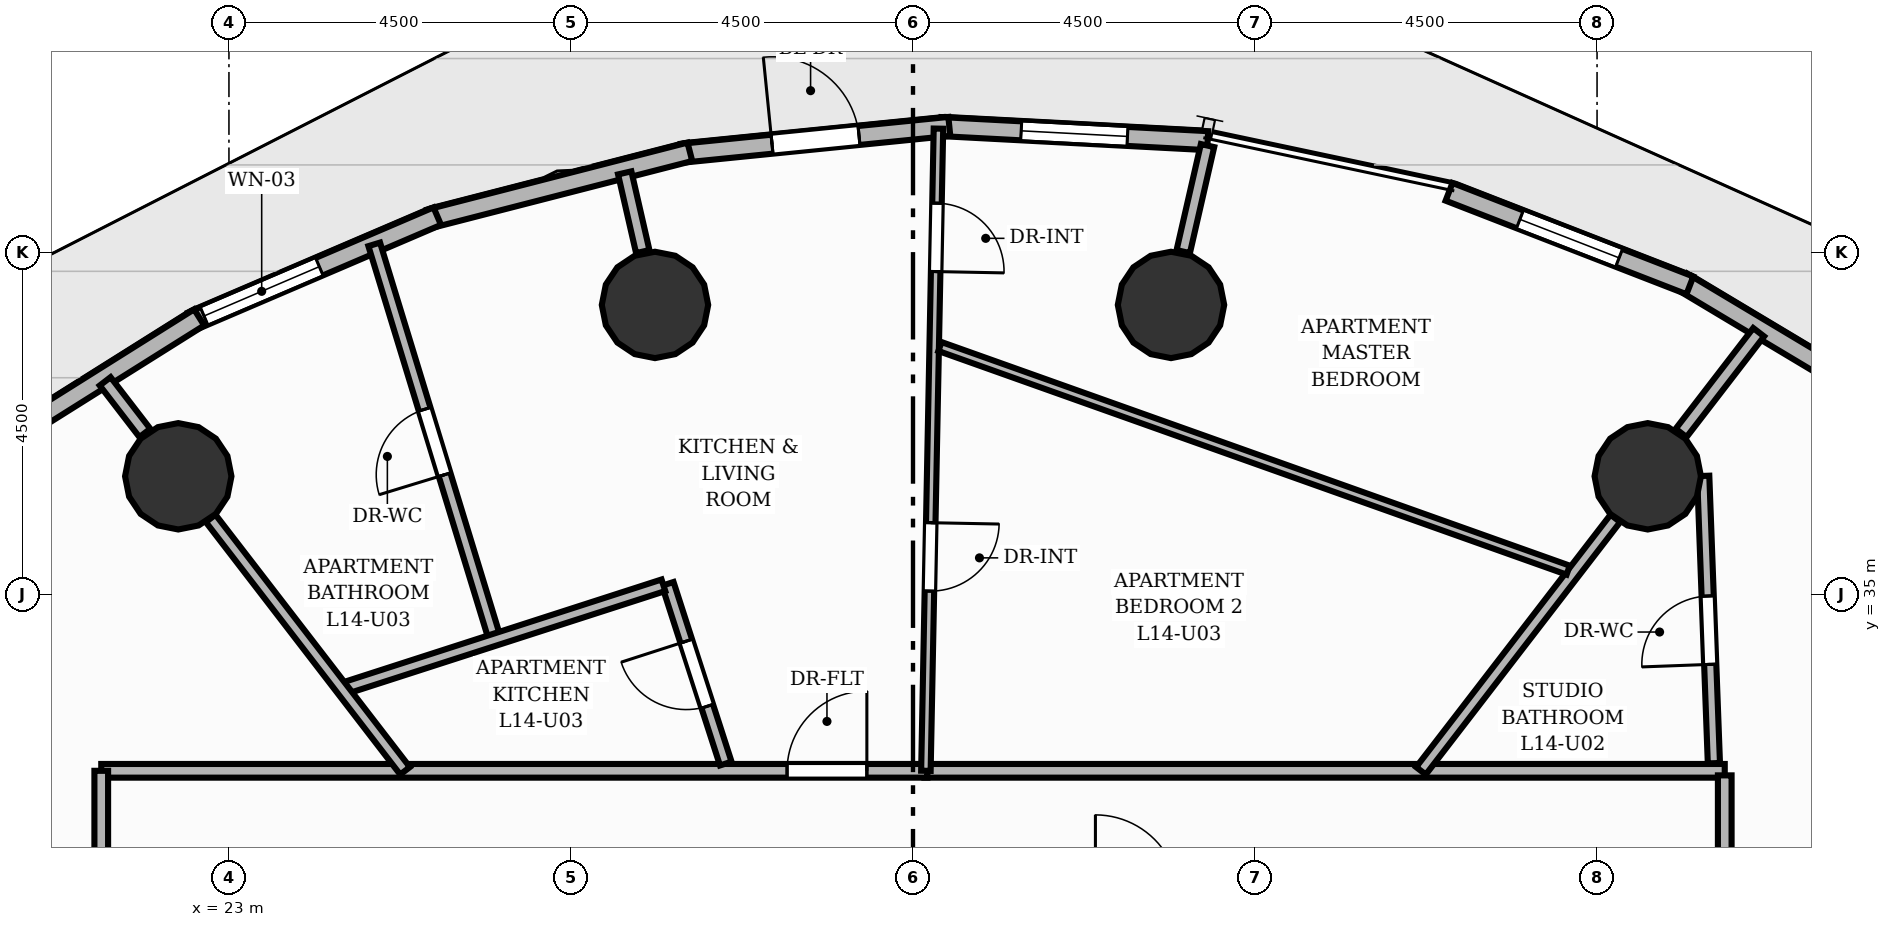
"""IFC4 building model, lengths in metres.
Left out: names, types, materials, properties, quantities, classifications, styles, units other than length and angle.
Written with IfcOpenShell. Run it as: python <this file> out.ifc"""

import sys

from ifc_helpers import new_model, si_unit, direction, frame, frame_2d, origin, origin_2d, place, context, subcontext, project, spatial, rectangle, circle, extrude, element, fill, save


model = new_model("IFC4")
c1 = context("Model", 3, precision=1e-05, world=origin(), true_north=direction((0.0, 1.0)))
c2 = subcontext(c1, "Body", "Model", "MODEL_VIEW")
j1 = project(units=[si_unit("LENGTHUNIT", "METRE"), si_unit("PLANEANGLEUNIT", "RADIAN")], contexts=[c1])
p1 = place(None, origin())
s1 = spatial("IfcSite", under=j1, at=p1, CompositionType="ELEMENT")
p2 = place(p1, origin())
s2 = spatial("IfcBuilding", under=s1, at=p2, CompositionType="ELEMENT")
p3 = place(p2, frame((0.0, 0.0, 50.4)))
s3 = spatial("IfcBuildingStorey", under=s2, at=p3, CompositionType="ELEMENT", Elevation=50.4)
for number, where, z_axis, x_axis in (
    (1, (41.667, 36.555, 0.0), (0.0, 0.0, 1.0), (1.0, 0.0, 0.0)),
    (2, (35.395, 38.81, 0.0), (0.0, 0.0, 1.0), (1.0, 0.0, 0.0)),
    (3, (28.605, 38.81, 0.0), (0.0, 0.0, 1.0), (1.0, 0.0, 0.0)),
    (4, (22.333, 36.555, 0.0), (0.0, 0.0, 1.0), (1.0, 0.0, 0.0)),
):
    element("IfcColumn", number, at=place(p3, frame(where, z_axis=z_axis, x_axis=x_axis)), inside=s3, PredefinedType="COLUMN", context=c2, shape_type="SweptSolid", body=[
        extrude(circle(Radius=0.7, at=origin_2d()), origin(), (0.0, 0.0, 1.0), 3.2),
    ])
p4 = place(p3, frame((42.122, 39.116, 0.0), z_axis=(0.0, 0.0, 1.0), x_axis=(0.858069400356, -0.513533742001, 0.0)))
e5 = element("IfcWall", 5, at=p4, inside=s3, PredefinedType="SOLIDWALL", context=c2, shape_type="SweptSolid", body=[
    extrude(rectangle(XDim=3.323, YDim=0.25, at=frame_2d((1.661, 0.0))), origin(), (0.0, 0.0, 1.0), 2.96),
])
p5 = place(p3, frame((39.053, 40.298, 0.0), z_axis=(0.0, 0.0, 1.0), x_axis=(0.932140755825, -0.362096135479, 0.0)))
e6 = element("IfcWall", 6, at=p5, inside=s3, PredefinedType="SOLIDWALL", context=c2, shape_type="SweptSolid", body=[
    extrude(rectangle(XDim=3.399, YDim=0.25, at=frame_2d((1.699, 0.0))), origin(), (0.0, 0.0, 1.0), 2.96),
])
p6 = place(p5, frame((1.0, 0.0, 0.85)))
e7 = element("IfcOpeningElement", 7, at=p6, cuts=e6, PredefinedType="OPENING", context=c2, shape_type="SweptSolid", body=[
    extrude(rectangle(XDim=1.4, YDim=1.55, at=frame_2d((0.7, 0.775))), frame((0.0, 0.135, 0.0), z_axis=(0.0, -1.0, 0.0), x_axis=(1.0, 0.0, 0.0)), (0.0, 0.0, 1.0), 0.27),
])
p7 = place(p3, frame((32.369, 41.156, 0.0), z_axis=(0.0, 0.0, 1.0), x_axis=(0.99860782827, -0.052748510102, 0.0)))
e8 = element("IfcWall", 8, at=p7, inside=s3, PredefinedType="SOLIDWALL", context=c2, shape_type="SweptSolid", body=[
    extrude(rectangle(XDim=3.513, YDim=0.25, at=frame_2d((1.756, 0.0))), origin(), (0.0, 0.0, 1.0), 2.96),
])
p8 = place(p7, frame((1.056, 0.0, 0.85)))
e9 = element("IfcOpeningElement", 9, at=p8, cuts=e8, PredefinedType="OPENING", context=c2, shape_type="SweptSolid", body=[
    extrude(rectangle(XDim=1.4, YDim=1.55, at=frame_2d((0.7, 0.775))), frame((0.0, 0.135, 0.0), z_axis=(0.0, -1.0, 0.0), x_axis=(1.0, 0.0, 0.0)), (0.0, 0.0, 1.0), 0.27),
])
p9 = place(p3, frame((28.957, 40.806, 0.0), z_axis=(0.0, 0.0, 1.0), x_axis=(0.994996115016, 0.099913618207, 0.0)))
e10 = element("IfcWall", 10, at=p9, inside=s3, PredefinedType="SOLIDWALL", context=c2, shape_type="SweptSolid", body=[
    extrude(rectangle(XDim=3.538, YDim=0.25, at=frame_2d((1.769, 0.0))), origin(), (0.0, 0.0, 1.0), 2.96),
])
p10 = place(p9, frame((1.194, 0.0, 0.0)))
e11 = element("IfcOpeningElement", 11, at=p10, cuts=e10, PredefinedType="OPENING", context=c2, shape_type="SweptSolid", body=[
    extrude(rectangle(XDim=1.15, YDim=2.2, at=frame_2d((0.575, 1.1))), frame((0.0, 0.135, 0.0), z_axis=(0.0, -1.0, 0.0), x_axis=(1.0, 0.0, 0.0)), (0.0, 0.0, 1.0), 0.27),
])
p11 = place(p3, frame((25.638, 39.943, 0.0), z_axis=(0.0, 0.0, 1.0), x_axis=(0.968459637573, 0.249170484594, 0.0)))
e12 = element("IfcWall", 12, at=p11, inside=s3, PredefinedType="SOLIDWALL", context=c2, shape_type="SweptSolid", body=[
    extrude(rectangle(XDim=3.538, YDim=0.25, at=frame_2d((1.769, 0.0))), origin(), (0.0, 0.0, 1.0), 2.96),
])
p12 = place(p3, frame((22.511, 38.595, 0.0), z_axis=(0.0, 0.0, 1.0), x_axis=(0.919263615987, 0.393642482872, 0.0)))
e13 = element("IfcWall", 13, at=p12, inside=s3, PredefinedType="SOLIDWALL", context=c2, shape_type="SweptSolid", body=[
    extrude(rectangle(XDim=3.513, YDim=0.25, at=frame_2d((1.756, 0.0))), origin(), (0.0, 0.0, 1.0), 2.96),
])
p13 = place(p12, frame((0.175, 0.0, 0.85)))
e14 = element("IfcOpeningElement", 14, at=p13, cuts=e13, PredefinedType="OPENING", context=c2, shape_type="SweptSolid", body=[
    extrude(rectangle(XDim=1.65, YDim=1.55, at=frame_2d((0.825, 0.775))), frame((0.0, 0.135, 0.0), z_axis=(0.0, -1.0, 0.0), x_axis=(1.0, 0.0, 0.0)), (0.0, 0.0, 1.0), 0.27),
])
p14 = place(p3, frame((19.674, 36.803, 0.0), z_axis=(0.0, 0.0, 1.0), x_axis=(0.846852351865, 0.531828068215, 0.0)))
e15 = element("IfcWall", 15, at=p14, inside=s3, PredefinedType="SOLIDWALL", context=c2, shape_type="SweptSolid", body=[
    extrude(rectangle(XDim=3.465, YDim=0.25, at=frame_2d((1.732, 0.0))), origin(), (0.0, 0.0, 1.0), 2.96),
])
p15 = place(p3, frame((42.106, 37.126, 0.0), z_axis=(0.0, 0.0, 1.0), x_axis=(0.610021184497, 0.792385104898, 0.0)))
e16 = element("IfcWall", 16, at=p15, inside=s3, PredefinedType="PARTITIONING", context=c2, shape_type="SweptSolid", body=[
    extrude(rectangle(XDim=1.672, YDim=0.18, at=frame_2d((0.836, 0.0))), origin(), (0.0, 0.0, 1.0), 2.178),
])
p16 = place(p3, frame((35.555, 39.512, 0.0), z_axis=(0.0, 0.0, 1.0), x_axis=(0.223463944202, 0.974712196313, 0.0)))
e17 = element("IfcWall", 17, at=p16, inside=s3, PredefinedType="PARTITIONING", context=c2, shape_type="SweptSolid", body=[
    extrude(rectangle(XDim=1.431, YDim=0.18, at=frame_2d((0.716, 0.0))), origin(), (0.0, 0.0, 1.0), 2.178),
])
p17 = place(p3, frame((28.445, 39.512, 0.0), z_axis=(0.0, 0.0, 1.0), x_axis=(-0.223348866575, 0.974738572028, 0.0)))
e18 = element("IfcWall", 18, at=p17, inside=s3, PredefinedType="PARTITIONING", context=c2, shape_type="SweptSolid", body=[
    extrude(rectangle(XDim=1.062, YDim=0.18, at=frame_2d((0.531, 0.0))), origin(), (0.0, 0.0, 1.0), 2.178),
])
p18 = place(p3, frame((21.894, 37.126, 0.0), z_axis=(0.0, 0.0, 1.0), x_axis=(-0.610124026743, 0.792305920709, 0.0)))
e19 = element("IfcWall", 19, at=p18, inside=s3, PredefinedType="PARTITIONING", context=c2, shape_type="SweptSolid", body=[
    extrude(rectangle(XDim=0.856, YDim=0.18, at=frame_2d((0.428, 0.0))), origin(), (0.0, 0.0, 1.0), 2.178),
])
p19 = place(p3, frame((32.15, 32.68, 0.0), z_axis=(0.0, 0.0, 1.0), x_axis=(1.0, 0.0, 0.0)))
e20 = element("IfcWall", 20, at=p19, inside=s3, PredefinedType="PARTITIONING", context=c2, shape_type="SweptSolid", body=[
    extrude(rectangle(XDim=10.53, YDim=0.18, at=frame_2d((5.265, 0.0))), origin(), (0.0, 0.0, 1.0), 2.955),
])
p20 = place(p3, frame((42.68, 32.62, 0.0), z_axis=(0.0, 0.0, 1.0), x_axis=(0.0, -1.0, 0.0)))
e21 = element("IfcWall", 21, at=p20, inside=s3, PredefinedType="PARTITIONING", context=c2, shape_type="SweptSolid", body=[
    extrude(rectangle(XDim=17.24, YDim=0.18, at=frame_2d((8.62, 0.0))), origin(), (0.0, 0.0, 1.0), 2.955),
])
p21 = place(p20, frame((8.095, 0.0, 0.0)))
e22 = element("IfcOpeningElement", 22, at=p21, cuts=e21, PredefinedType="OPENING", context=c2, shape_type="SweptSolid", body=[
    extrude(rectangle(XDim=1.05, YDim=2.15, at=frame_2d((0.525, 1.075))), frame((0.0, 0.1, 0.0), z_axis=(0.0, -1.0, 0.0), x_axis=(1.0, 0.0, 0.0)), (0.0, 0.0, 1.0), 0.2),
])
p22 = place(p3, frame((21.32, 32.68, 0.0), z_axis=(0.0, 0.0, 1.0), x_axis=(1.0, 0.0, 0.0)))
e23 = element("IfcWall", 23, at=p22, inside=s3, PredefinedType="PARTITIONING", context=c2, shape_type="SweptSolid", body=[
    extrude(rectangle(XDim=10.87, YDim=0.18, at=frame_2d((5.435, 0.0))), origin(), (0.0, 0.0, 1.0), 2.955),
])
p23 = place(p22, frame((9.023, 0.0, 0.0)))
e24 = element("IfcOpeningElement", 24, at=p23, cuts=e23, PredefinedType="OPENING", context=c2, shape_type="SweptSolid", body=[
    extrude(rectangle(XDim=1.05, YDim=2.15, at=frame_2d((0.525, 1.075))), frame((0.0, 0.1, 0.0), z_axis=(0.0, -1.0, 0.0), x_axis=(1.0, 0.0, 0.0)), (0.0, 0.0, 1.0), 0.2),
])
p24 = place(p3, frame((21.32, 15.38, 0.0), z_axis=(0.0, 0.0, 1.0), x_axis=(0.0, 1.0, 0.0)))
e25 = element("IfcWall", 25, at=p24, inside=s3, PredefinedType="PARTITIONING", context=c2, shape_type="SweptSolid", body=[
    extrude(rectangle(XDim=17.3, YDim=0.18, at=frame_2d((8.65, 0.0))), origin(), (0.0, 0.0, 1.0), 2.955),
])
p25 = place(p24, frame((8.125, 0.0, 0.0)))
e26 = element("IfcOpeningElement", 26, at=p25, cuts=e25, PredefinedType="OPENING", context=c2, shape_type="SweptSolid", body=[
    extrude(rectangle(XDim=1.05, YDim=2.15, at=frame_2d((0.525, 1.075))), frame((0.0, 0.1, 0.0), z_axis=(0.0, -1.0, 0.0), x_axis=(1.0, 0.0, 0.0)), (0.0, 0.0, 1.0), 0.2),
])
p26 = place(p3, frame((42.537, 32.78, 0.0), z_axis=(0.0, 0.0, 1.0), x_axis=(-0.037109528702, 0.99931120422, 0.0)))
e27 = element("IfcWall", 27, at=p26, inside=s3, PredefinedType="PLUMBINGWALL", context=c2, shape_type="SweptSolid", body=[
    extrude(rectangle(XDim=3.783, YDim=0.16, at=frame_2d((1.892, 0.0))), origin(), (0.0, 0.0, 1.0), 2.955),
])
p27 = place(p26, frame((1.302, 0.0, 0.0)))
e28 = element("IfcOpeningElement", 28, at=p27, cuts=e27, PredefinedType="OPENING", context=c2, shape_type="SweptSolid", body=[
    extrude(rectangle(XDim=0.9, YDim=2.1, at=frame_2d((0.45, 1.05))), frame((0.0, 0.09, 0.0), z_axis=(0.0, -1.0, 0.0), x_axis=(1.0, 0.0, 0.0)), (0.0, 0.0, 1.0), 0.18),
])
p28 = place(p3, frame((38.683, 32.68, 0.0), z_axis=(0.0, 0.0, 1.0), x_axis=(0.610034370134, 0.792374953703, 0.0)))
e29 = element("IfcWall", 29, at=p28, inside=s3, PredefinedType="PLUMBINGWALL", context=c2, shape_type="SweptSolid", body=[
    extrude(rectangle(XDim=4.192, YDim=0.16, at=frame_2d((2.096, 0.0))), origin(), (0.0, 0.0, 1.0), 2.178),
])
p29 = place(p3, frame((26.5, 34.406, 0.0), z_axis=(0.0, 0.0, 1.0), x_axis=(-0.292167210162, 0.956367252318, 0.0)))
e30 = element("IfcWall", 30, at=p29, inside=s3, PredefinedType="PLUMBINGWALL", context=c2, shape_type="SweptSolid", body=[
    extrude(rectangle(XDim=5.438, YDim=0.16, at=frame_2d((2.719, 0.0))), origin(), (0.0, 0.0, 1.0), 2.955),
])
p30 = place(p29, frame((2.269, 0.0, 0.0)))
e31 = element("IfcOpeningElement", 31, at=p30, cuts=e30, PredefinedType="OPENING", context=c2, shape_type="SweptSolid", body=[
    extrude(rectangle(XDim=0.9, YDim=2.1, at=frame_2d((0.45, 1.05))), frame((0.0, 0.09, 0.0), z_axis=(0.0, -1.0, 0.0), x_axis=(1.0, 0.0, 0.0)), (0.0, 0.0, 1.0), 0.18),
])
p31 = place(p3, frame((32.335, 41.13, 0.0), z_axis=(0.0, 0.0, 1.0), x_axis=(-0.019528202577, -0.99980930647, 0.0)))
e32 = element("IfcWall", 32, at=p31, inside=s3, PredefinedType="PARTITIONING", context=c2, shape_type="SweptSolid", body=[
    extrude(rectangle(XDim=8.451, YDim=0.125, at=frame_2d((4.226, 0.0))), origin(), (0.0, 0.0, 1.0), 2.955),
])
p32 = place(p31, frame((0.981, 0.0, 0.0)))
e33 = element("IfcOpeningElement", 33, at=p32, cuts=e32, PredefinedType="OPENING", context=c2, shape_type="SweptSolid", body=[
    extrude(rectangle(XDim=0.9, YDim=2.1, at=frame_2d((0.45, 1.05))), frame((0.0, 0.073, 0.0), z_axis=(0.0, -1.0, 0.0), x_axis=(1.0, 0.0, 0.0)), (0.0, 0.0, 1.0), 0.145),
])
p33 = place(p31, frame((5.186, 0.0, 0.0)))
e34 = element("IfcOpeningElement", 34, at=p33, cuts=e32, PredefinedType="OPENING", context=c2, shape_type="SweptSolid", body=[
    extrude(rectangle(XDim=0.9, YDim=2.1, at=frame_2d((0.45, 1.05))), frame((0.0, 0.073, 0.0), z_axis=(0.0, -1.0, 0.0), x_axis=(1.0, 0.0, 0.0)), (0.0, 0.0, 1.0), 0.145),
])
p34 = place(p3, frame((29.537, 32.775, 0.0), z_axis=(0.0, 0.0, 1.0), x_axis=(-0.307163549255, 0.951656741693, 0.0)))
e35 = element("IfcWall", 35, at=p34, inside=s3, PredefinedType="PLUMBINGWALL", context=c2, shape_type="SweptSolid", body=[
    extrude(rectangle(XDim=2.485, YDim=0.16, at=frame_2d((1.242, 0.0))), origin(), (0.0, 0.0, 1.0), 2.955),
])
p35 = place(p34, frame((0.792, 0.0, 0.0)))
e36 = element("IfcOpeningElement", 36, at=p35, cuts=e35, PredefinedType="OPENING", context=c2, shape_type="SweptSolid", body=[
    extrude(rectangle(XDim=0.9, YDim=2.1, at=frame_2d((0.45, 1.05))), frame((0.0, 0.09, 0.0), z_axis=(0.0, -1.0, 0.0), x_axis=(1.0, 0.0, 0.0)), (0.0, 0.0, 1.0), 0.18),
])
p36 = place(p3, frame((28.716, 35.121, 0.0), z_axis=(0.0, 0.0, 1.0), x_axis=(-0.951640751353, -0.307213086253, 0.0)))
e37 = element("IfcWall", 37, at=p36, inside=s3, PredefinedType="PLUMBINGWALL", context=c2, shape_type="SweptSolid", body=[
    extrude(rectangle(XDim=4.443, YDim=0.16, at=frame_2d((2.222, 0.0))), origin(), (0.0, 0.0, 1.0), 2.955),
])
p37 = place(p3, frame((25.317, 32.68, 0.0), z_axis=(0.0, 0.0, 1.0), x_axis=(-0.610070932863, 0.792346803411, 0.0)))
e38 = element("IfcWall", 38, at=p37, inside=s3, PredefinedType="PLUMBINGWALL", context=c2, shape_type="SweptSolid", body=[
    extrude(rectangle(XDim=4.192, YDim=0.16, at=frame_2d((2.096, 0.0))), origin(), (0.0, 0.0, 1.0), 2.178),
])
p38 = place(p3, frame((40.62, 35.32, 0.0), z_axis=(0.0, 0.0, 1.0), x_axis=(-0.9420945855, 0.335347270709, 0.0)))
e39 = element("IfcWall", 39, at=p38, inside=s3, PredefinedType="PARTITIONING", context=c2, shape_type="SweptSolid", body=[
    extrude(rectangle(XDim=8.773, YDim=0.125, at=frame_2d((4.387, 0.0))), origin(), (0.0, 0.0, 1.0), 2.955),
])
p39 = place(p10, origin())
e40 = element("IfcDoor", 40, at=p39, inside=s3, OperationType="SINGLE_SWING_LEFT", PredefinedType="DOOR", context=c2, shape_type="SweptSolid", body=[
    extrude(rectangle(XDim=1.15, YDim=2.2, at=frame_2d((0.575, 1.1))), frame((0.0, 0.025, 0.0), z_axis=(0.0, -1.0, 0.0), x_axis=(1.0, 0.0, 0.0)), (0.0, 0.0, 1.0), 0.05),
])
fill(e11, e40)
p40 = place(p6, origin())
e41 = element("IfcWindow", 41, at=p40, inside=s3, PartitioningType="SINGLE_PANEL", PredefinedType="WINDOW", context=c2, shape_type="SweptSolid", body=[
    extrude(rectangle(XDim=1.4, YDim=1.55, at=frame_2d((0.7, 0.775))), frame((0.0, 0.03, 0.0), z_axis=(0.0, -1.0, 0.0), x_axis=(1.0, 0.0, 0.0)), (0.0, 0.0, 1.0), 0.06),
])
fill(e7, e41)
p41 = place(p8, origin())
e42 = element("IfcWindow", 42, at=p41, inside=s3, PartitioningType="SINGLE_PANEL", PredefinedType="WINDOW", context=c2, shape_type="SweptSolid", body=[
    extrude(rectangle(XDim=1.4, YDim=1.55, at=frame_2d((0.7, 0.775))), frame((0.0, 0.03, 0.0), z_axis=(0.0, -1.0, 0.0), x_axis=(1.0, 0.0, 0.0)), (0.0, 0.0, 1.0), 0.06),
])
fill(e9, e42)
p42 = place(p13, origin())
e43 = element("IfcWindow", 43, at=p42, inside=s3, PartitioningType="SINGLE_PANEL", PredefinedType="WINDOW", context=c2, shape_type="SweptSolid", body=[
    extrude(rectangle(XDim=1.65, YDim=1.55, at=frame_2d((0.825, 0.775))), frame((0.0, 0.03, 0.0), z_axis=(0.0, -1.0, 0.0), x_axis=(1.0, 0.0, 0.0)), (0.0, 0.0, 1.0), 0.06),
])
fill(e14, e43)
p43 = place(p27, origin())
e44 = element("IfcDoor", 44, at=p43, inside=s3, OperationType="SINGLE_SWING_LEFT", PredefinedType="DOOR", context=c2, shape_type="SweptSolid", body=[
    extrude(rectangle(XDim=0.9, YDim=2.1, at=frame_2d((0.45, 1.05))), frame((0.0, 0.025, 0.0), z_axis=(0.0, -1.0, 0.0), x_axis=(1.0, 0.0, 0.0)), (0.0, 0.0, 1.0), 0.05),
])
fill(e28, e44)
p44 = place(p23, origin())
e45 = element("IfcDoor", 45, at=p44, inside=s3, OperationType="SINGLE_SWING_RIGHT", PredefinedType="DOOR", context=c2, shape_type="SweptSolid", body=[
    extrude(rectangle(XDim=1.05, YDim=2.15, at=frame_2d((0.525, 1.075))), frame((0.0, 0.025, 0.0), z_axis=(0.0, -1.0, 0.0), x_axis=(1.0, 0.0, 0.0)), (0.0, 0.0, 1.0), 0.05),
])
fill(e24, e45)
p45 = place(p30, origin())
e46 = element("IfcDoor", 46, at=p45, inside=s3, OperationType="SINGLE_SWING_LEFT", PredefinedType="DOOR", context=c2, shape_type="SweptSolid", body=[
    extrude(rectangle(XDim=0.9, YDim=2.1, at=frame_2d((0.45, 1.05))), frame((0.0, 0.025, 0.0), z_axis=(0.0, -1.0, 0.0), x_axis=(1.0, 0.0, 0.0)), (0.0, 0.0, 1.0), 0.05),
])
fill(e31, e46)
p46 = place(p32, origin())
e47 = element("IfcDoor", 47, at=p46, inside=s3, OperationType="SINGLE_SWING_RIGHT", PredefinedType="DOOR", context=c2, shape_type="SweptSolid", body=[
    extrude(rectangle(XDim=0.9, YDim=2.1, at=frame_2d((0.45, 1.05))), frame((0.0, 0.025, 0.0), z_axis=(0.0, -1.0, 0.0), x_axis=(1.0, 0.0, 0.0)), (0.0, 0.0, 1.0), 0.05),
])
fill(e33, e47)
p47 = place(p33, origin())
e48 = element("IfcDoor", 48, at=p47, inside=s3, OperationType="SINGLE_SWING_LEFT", PredefinedType="DOOR", context=c2, shape_type="SweptSolid", body=[
    extrude(rectangle(XDim=0.9, YDim=2.1, at=frame_2d((0.45, 1.05))), frame((0.0, 0.025, 0.0), z_axis=(0.0, -1.0, 0.0), x_axis=(1.0, 0.0, 0.0)), (0.0, 0.0, 1.0), 0.05),
])
fill(e34, e48)
p48 = place(p35, origin())
e49 = element("IfcDoor", 49, at=p48, inside=s3, OperationType="SINGLE_SWING_RIGHT", PredefinedType="DOOR", context=c2, shape_type="SweptSolid", body=[
    extrude(rectangle(XDim=0.9, YDim=2.1, at=frame_2d((0.45, 1.05))), frame((0.0, 0.025, 0.0), z_axis=(0.0, -1.0, 0.0), x_axis=(1.0, 0.0, 0.0)), (0.0, 0.0, 1.0), 0.05),
])
fill(e36, e49)
save(model, sys.argv[1])
